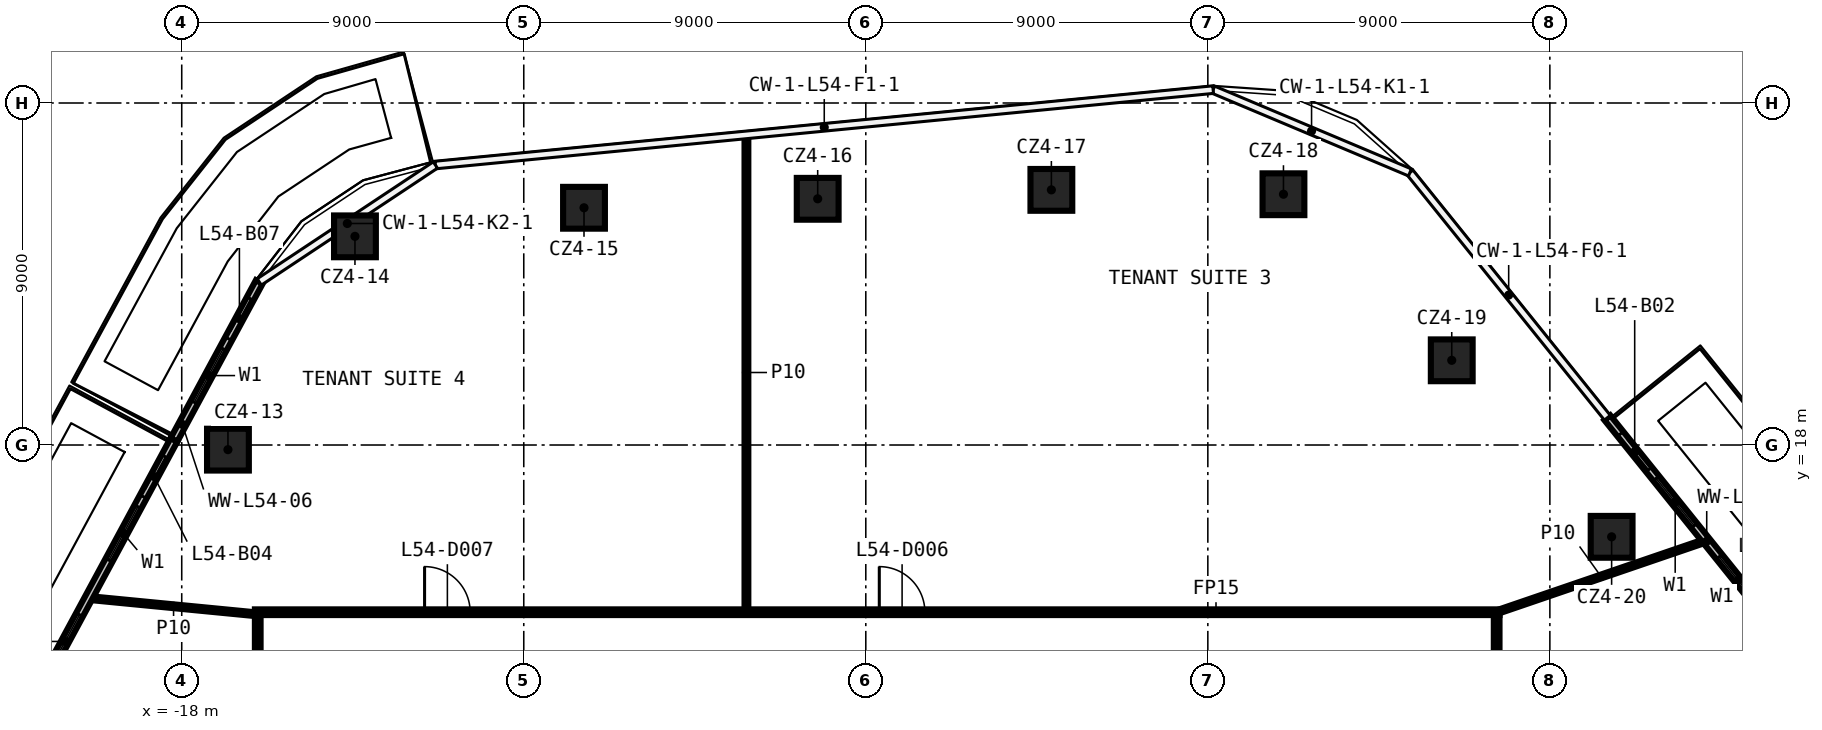
"""IFC4 building model, lengths in metres.
Left out: names, types, materials, properties, quantities, classifications, styles, units other than length and angle.
Written with IfcOpenShell. Run it as: python <this file> out.ifc"""

import sys

from ifc_helpers import new_model, si_unit, direction, frame, frame_2d, origin, origin_2d, place, context, subcontext, project, spatial, rectangle, extrude, element, fill, save


model = new_model("IFC4")
c1 = context("Model", 3, precision=1e-05, world=origin(), true_north=direction((0.0, 1.0)))
c2 = subcontext(c1, "Body", "Model", "MODEL_VIEW")
j1 = project(units=[si_unit("LENGTHUNIT", "METRE"), si_unit("PLANEANGLEUNIT", "RADIAN")], contexts=[c1])
p1 = place(None, origin())
s1 = spatial("IfcSite", under=j1, at=p1, CompositionType="ELEMENT")
p2 = place(p1, origin())
s2 = spatial("IfcBuilding", under=s1, at=p2, CompositionType="ELEMENT")
p3 = place(p2, frame((0.0, 0.0, 258.0)))
s3 = spatial("IfcBuildingStorey", under=s2, at=p3, CompositionType="ELEMENT", Elevation=258.0)
for number, where, z_axis, x_axis in (
    (1, (-16.784, 17.878, 0.0), (0.0, 0.0, 1.0), (1.0, 0.0, 0.0)),
    (2, (-13.442, 23.491, 0.0), (0.0, 0.0, 1.0), (1.0, 0.0, 0.0)),
    (3, (-7.415, 24.243, 0.0), (0.0, 0.0, 1.0), (1.0, 0.0, 0.0)),
    (4, (-1.266, 24.479, 0.0), (0.0, 0.0, 1.0), (1.0, 0.0, 0.0)),
    (5, (4.883, 24.714, 0.0), (0.0, 0.0, 1.0), (1.0, 0.0, 0.0)),
    (6, (10.99, 24.599, 0.0), (0.0, 0.0, 1.0), (1.0, 0.0, 0.0)),
    (7, (15.418, 20.229, 0.0), (0.0, 0.0, 1.0), (1.0, 0.0, 0.0)),
    (8, (19.625, 15.584, 0.0), (0.0, 0.0, 1.0), (1.0, 0.0, 0.0)),
):
    element("IfcColumn", number, at=place(p3, frame(where, z_axis=z_axis, x_axis=x_axis)), inside=s3, PredefinedType="COLUMN", context=c2, shape_type="SweptSolid", body=[
        extrude(rectangle(XDim=1.1, YDim=1.1, at=origin_2d()), origin(), (0.0, 0.0, 1.0), 3.82),
    ])
p4 = place(p3, frame((-16.075, 13.6, 0.0), z_axis=(0.0, 0.0, 1.0), x_axis=(1.0, 0.0, 0.0)))
e9 = element("IfcWall", 9, at=p4, inside=s3, PredefinedType="PARTITIONING", context=c2, shape_type="SweptSolid", body=[
    extrude(rectangle(XDim=32.75, YDim=0.15, at=frame_2d((16.375, 0.0))), origin(), (0.0, 0.0, 1.0), 3.82),
])
p5 = place(p4, frame((16.43, 0.0, 0.0)))
e10 = element("IfcOpeningElement", 10, at=p5, cuts=e9, PredefinedType="OPENING", context=c2, shape_type="SweptSolid", body=[
    extrude(rectangle(XDim=1.2, YDim=2.1, at=frame_2d((0.6, 1.05))), frame((0.0, 0.085, 0.0), z_axis=(0.0, -1.0, 0.0), x_axis=(1.0, 0.0, 0.0)), (0.0, 0.0, 1.0), 0.17),
])
p6 = place(p4, frame((4.465, 0.0, 0.0)))
e11 = element("IfcOpeningElement", 11, at=p6, cuts=e9, PredefinedType="OPENING", context=c2, shape_type="SweptSolid", body=[
    extrude(rectangle(XDim=1.2, YDim=2.1, at=frame_2d((0.6, 1.05))), frame((0.0, 0.085, 0.0), z_axis=(0.0, -1.0, 0.0), x_axis=(1.0, 0.0, 0.0)), (0.0, 0.0, 1.0), 0.17),
])
p7 = place(p3, frame((16.6, 13.6, 0.0), z_axis=(0.0, 0.0, 1.0), x_axis=(0.946142628781, 0.323750098073, 0.0)))
e12 = element("IfcWall", 12, at=p7, inside=s3, PredefinedType="PARTITIONING", context=c2, shape_type="SweptSolid", body=[
    extrude(rectangle(XDim=5.805, YDim=0.1, at=frame_2d((2.903, 0.0))), origin(), (0.0, 0.0, 1.0), 3.82),
])
p8 = place(p3, frame((16.6, 13.525, 0.0), z_axis=(0.0, 0.0, 1.0), x_axis=(0.0, -1.0, 0.0)))
e13 = element("IfcWall", 13, at=p8, inside=s3, PredefinedType="PARTITIONING", context=c2, shape_type="SweptSolid", body=[
    extrude(rectangle(XDim=27.05, YDim=0.15, at=frame_2d((13.525, 0.0))), origin(), (0.0, 0.0, 1.0), 3.82),
])
p9 = place(p8, frame((22.559, 0.0, 0.0)))
e14 = element("IfcOpeningElement", 14, at=p9, cuts=e13, PredefinedType="OPENING", context=c2, shape_type="SweptSolid", body=[
    extrude(rectangle(XDim=1.2, YDim=2.1, at=frame_2d((0.6, 1.05))), frame((0.0, 0.085, 0.0), z_axis=(0.0, -1.0, 0.0), x_axis=(1.0, 0.0, 0.0)), (0.0, 0.0, 1.0), 0.17),
])
p10 = place(p8, frame((11.036, 0.0, 0.0)))
e15 = element("IfcOpeningElement", 15, at=p10, cuts=e13, PredefinedType="OPENING", context=c2, shape_type="SweptSolid", body=[
    extrude(rectangle(XDim=1.2, YDim=2.1, at=frame_2d((0.6, 1.05))), frame((0.0, 0.085, 0.0), z_axis=(0.0, -1.0, 0.0), x_axis=(1.0, 0.0, 0.0)), (0.0, 0.0, 1.0), 0.17),
])
p11 = place(p3, frame((-3.141, 13.675, 0.0), z_axis=(0.0, 0.0, 1.0), x_axis=(0.0, 1.0, 0.0)))
e16 = element("IfcWall", 16, at=p11, inside=s3, PredefinedType="PARTITIONING", context=c2, shape_type="SweptSolid", body=[
    extrude(rectangle(XDim=12.466, YDim=0.1, at=frame_2d((6.233, 0.0))), origin(), (0.0, 0.0, 1.0), 3.82),
])
p12 = place(p3, frame((-16.0, 11.074, 0.0), z_axis=(0.0, 0.0, 1.0), x_axis=(0.0, 1.0, 0.0)))
e17 = element("IfcWall", 17, at=p12, inside=s3, PredefinedType="PARTITIONING", context=c2, shape_type="SweptSolid", body=[
    extrude(rectangle(XDim=2.451, YDim=0.15, at=frame_2d((1.226, 0.0))), origin(), (0.0, 0.0, 1.0), 3.82),
])
p13 = place(p3, frame((-20.43, 13.972, 0.0), z_axis=(0.0, 0.0, 1.0), x_axis=(0.995312443594, -0.096711631286, 0.0)))
e18 = element("IfcWall", 18, at=p13, inside=s3, PredefinedType="PARTITIONING", context=c2, shape_type="SweptSolid", body=[
    extrude(rectangle(XDim=4.45, YDim=0.1, at=frame_2d((2.225, 0.0))), origin(), (0.0, 0.0, 1.0), 3.82),
])
p14 = place(p3, frame((24.712, 12.255, 0.0), z_axis=(0.0, 0.0, 1.0), x_axis=(-0.626871708653, 0.77912249415, 0.0)))
e19 = element("IfcWall", 19, at=p14, inside=s3, PredefinedType="SOLIDWALL", context=c2, shape_type="SweptSolid", body=[
    extrude(rectangle(XDim=8.293, YDim=0.2, at=frame_2d((4.147, 0.0))), origin(), (0.0, 0.0, 1.0), 3.82),
])
p15 = place(p14, frame((2.0, 0.0, 0.6)))
e20 = element("IfcOpeningElement", 20, at=p15, cuts=e19, PredefinedType="OPENING", context=c2, shape_type="SweptSolid", body=[
    extrude(rectangle(XDim=1.6, YDim=2.4, at=frame_2d((0.8, 1.2))), frame((0.0, 0.11, 0.0), z_axis=(0.0, -1.0, 0.0), x_axis=(1.0, 0.0, 0.0)), (0.0, 0.0, 1.0), 0.22),
])
p16 = place(p14, frame((0.5, 0.0, 0.0)))
e21 = element("IfcOpeningElement", 21, at=p16, cuts=e19, PredefinedType="OPENING", context=c2, shape_type="SweptSolid", body=[
    extrude(rectangle(XDim=1.2, YDim=2.4, at=frame_2d((0.6, 1.2))), frame((0.0, 0.11, 0.0), z_axis=(0.0, -1.0, 0.0), x_axis=(1.0, 0.0, 0.0)), (0.0, 0.0, 1.0), 0.22),
])
p17 = place(p14, frame((4.647, 0.0, 0.6)))
e22 = element("IfcOpeningElement", 22, at=p17, cuts=e19, PredefinedType="OPENING", context=c2, shape_type="SweptSolid", body=[
    extrude(rectangle(XDim=1.6, YDim=2.4, at=frame_2d((0.8, 1.2))), frame((0.0, 0.11, 0.0), z_axis=(0.0, -1.0, 0.0), x_axis=(1.0, 0.0, 0.0)), (0.0, 0.0, 1.0), 0.22),
])
p18 = place(p14, frame((6.547, 0.0, 0.0)))
e23 = element("IfcOpeningElement", 23, at=p18, cuts=e19, PredefinedType="OPENING", context=c2, shape_type="SweptSolid", body=[
    extrude(rectangle(XDim=1.2, YDim=2.4, at=frame_2d((0.6, 1.2))), frame((0.0, 0.11, 0.0), z_axis=(0.0, -1.0, 0.0), x_axis=(1.0, 0.0, 0.0)), (0.0, 0.0, 1.0), 0.22),
])
p19 = place(p3, frame((-18.204, 18.136, 0.0), z_axis=(0.0, 0.0, 1.0), x_axis=(-0.475207525375, -0.87987374539, 0.0)))
e24 = element("IfcWall", 24, at=p19, inside=s3, PredefinedType="SOLIDWALL", context=c2, shape_type="SweptSolid", body=[
    extrude(rectangle(XDim=14.19, YDim=0.2, at=frame_2d((7.095, 0.0))), origin(), (0.0, 0.0, 1.0), 3.82),
])
p20 = place(p19, frame((2.0, 0.0, 0.6)))
e25 = element("IfcOpeningElement", 25, at=p20, cuts=e24, PredefinedType="OPENING", context=c2, shape_type="SweptSolid", body=[
    extrude(rectangle(XDim=1.6, YDim=2.4, at=frame_2d((0.8, 1.2))), frame((0.0, 0.11, 0.0), z_axis=(0.0, -1.0, 0.0), x_axis=(1.0, 0.0, 0.0)), (0.0, 0.0, 1.0), 0.22),
])
p21 = place(p19, frame((0.5, 0.0, 0.0)))
e26 = element("IfcOpeningElement", 26, at=p21, cuts=e24, PredefinedType="OPENING", context=c2, shape_type="SweptSolid", body=[
    extrude(rectangle(XDim=1.2, YDim=2.4, at=frame_2d((0.6, 1.2))), frame((0.0, 0.11, 0.0), z_axis=(0.0, -1.0, 0.0), x_axis=(1.0, 0.0, 0.0)), (0.0, 0.0, 1.0), 0.22),
])
p22 = place(p19, frame((5.23, 0.0, 0.6)))
e27 = element("IfcOpeningElement", 27, at=p22, cuts=e24, PredefinedType="OPENING", context=c2, shape_type="SweptSolid", body=[
    extrude(rectangle(XDim=1.6, YDim=2.4, at=frame_2d((0.8, 1.2))), frame((0.0, 0.11, 0.0), z_axis=(0.0, -1.0, 0.0), x_axis=(1.0, 0.0, 0.0)), (0.0, 0.0, 1.0), 0.22),
])
p23 = place(p19, frame((7.13, 0.0, 0.0)))
e28 = element("IfcOpeningElement", 28, at=p23, cuts=e24, PredefinedType="OPENING", context=c2, shape_type="SweptSolid", body=[
    extrude(rectangle(XDim=1.2, YDim=2.4, at=frame_2d((0.6, 1.2))), frame((0.0, 0.11, 0.0), z_axis=(0.0, -1.0, 0.0), x_axis=(1.0, 0.0, 0.0)), (0.0, 0.0, 1.0), 0.22),
])
p24 = place(p19, frame((11.46, 0.0, 0.6)))
e29 = element("IfcOpeningElement", 29, at=p24, cuts=e24, PredefinedType="OPENING", context=c2, shape_type="SweptSolid", body=[
    extrude(rectangle(XDim=1.6, YDim=2.4, at=frame_2d((0.8, 1.2))), frame((0.0, 0.11, 0.0), z_axis=(0.0, -1.0, 0.0), x_axis=(1.0, 0.0, 0.0)), (0.0, 0.0, 1.0), 0.22),
])
p25 = place(p19, frame((9.96, 0.0, 0.0)))
e30 = element("IfcOpeningElement", 30, at=p25, cuts=e24, PredefinedType="OPENING", context=c2, shape_type="SweptSolid", body=[
    extrude(rectangle(XDim=1.2, YDim=2.4, at=frame_2d((0.6, 1.2))), frame((0.0, 0.11, 0.0), z_axis=(0.0, -1.0, 0.0), x_axis=(1.0, 0.0, 0.0)), (0.0, 0.0, 1.0), 0.22),
])
p26 = place(p3, frame((-15.96, 22.291, 0.0), z_axis=(0.0, 0.0, 1.0), x_axis=(-0.47520015235, -0.879877727418, 0.0)))
e31 = element("IfcWall", 31, at=p26, inside=s3, PredefinedType="SOLIDWALL", context=c2, shape_type="SweptSolid", body=[
    extrude(rectangle(XDim=4.722, YDim=0.2, at=frame_2d((2.361, 0.0))), origin(), (0.0, 0.0, 1.0), 3.82),
])
p27 = place(p26, frame((2.0, 0.0, 0.6)))
e32 = element("IfcOpeningElement", 32, at=p27, cuts=e31, PredefinedType="OPENING", context=c2, shape_type="SweptSolid", body=[
    extrude(rectangle(XDim=1.6, YDim=2.4, at=frame_2d((0.8, 1.2))), frame((0.0, 0.11, 0.0), z_axis=(0.0, -1.0, 0.0), x_axis=(1.0, 0.0, 0.0)), (0.0, 0.0, 1.0), 0.22),
])
p28 = place(p26, frame((0.5, 0.0, 0.0)))
e33 = element("IfcOpeningElement", 33, at=p28, cuts=e31, PredefinedType="OPENING", context=c2, shape_type="SweptSolid", body=[
    extrude(rectangle(XDim=1.2, YDim=2.4, at=frame_2d((0.6, 1.2))), frame((0.0, 0.11, 0.0), z_axis=(0.0, -1.0, 0.0), x_axis=(1.0, 0.0, 0.0)), (0.0, 0.0, 1.0), 0.22),
])
p29 = place(p5, origin())
e34 = element("IfcDoor", 34, at=p29, inside=s3, OperationType="SINGLE_SWING_LEFT", PredefinedType="DOOR", context=c2, shape_type="SweptSolid", body=[
    extrude(rectangle(XDim=1.2, YDim=2.1, at=frame_2d((0.6, 1.05))), frame((0.0, 0.025, 0.0), z_axis=(0.0, -1.0, 0.0), x_axis=(1.0, 0.0, 0.0)), (0.0, 0.0, 1.0), 0.05),
])
fill(e10, e34)
p30 = place(p6, origin())
e35 = element("IfcDoor", 35, at=p30, inside=s3, OperationType="SINGLE_SWING_RIGHT", PredefinedType="DOOR", context=c2, shape_type="SweptSolid", body=[
    extrude(rectangle(XDim=1.2, YDim=2.1, at=frame_2d((0.6, 1.05))), frame((0.0, 0.025, 0.0), z_axis=(0.0, -1.0, 0.0), x_axis=(1.0, 0.0, 0.0)), (0.0, 0.0, 1.0), 0.05),
])
fill(e11, e35)
p31 = place(p15, origin())
e36 = element("IfcWindow", 36, at=p31, inside=s3, PartitioningType="SINGLE_PANEL", PredefinedType="WINDOW", context=c2, shape_type="SweptSolid", body=[
    extrude(rectangle(XDim=1.6, YDim=2.4, at=frame_2d((0.8, 1.2))), frame((0.0, 0.03, 0.0), z_axis=(0.0, -1.0, 0.0), x_axis=(1.0, 0.0, 0.0)), (0.0, 0.0, 1.0), 0.06),
])
fill(e20, e36)
p32 = place(p17, origin())
e37 = element("IfcWindow", 37, at=p32, inside=s3, PartitioningType="SINGLE_PANEL", PredefinedType="WINDOW", context=c2, shape_type="SweptSolid", body=[
    extrude(rectangle(XDim=1.6, YDim=2.4, at=frame_2d((0.8, 1.2))), frame((0.0, 0.03, 0.0), z_axis=(0.0, -1.0, 0.0), x_axis=(1.0, 0.0, 0.0)), (0.0, 0.0, 1.0), 0.06),
])
fill(e22, e37)
p33 = place(p18, origin())
e38 = element("IfcDoor", 38, at=p33, inside=s3, OperationType="SLIDING_TO_LEFT", PredefinedType="DOOR", context=c2, shape_type="SweptSolid", body=[
    extrude(rectangle(XDim=1.2, YDim=2.4, at=frame_2d((0.6, 1.2))), frame((0.0, 0.025, 0.0), z_axis=(0.0, -1.0, 0.0), x_axis=(1.0, 0.0, 0.0)), (0.0, 0.0, 1.0), 0.05),
])
fill(e23, e38)
p34 = place(p20, origin())
e39 = element("IfcWindow", 39, at=p34, inside=s3, PartitioningType="SINGLE_PANEL", PredefinedType="WINDOW", context=c2, shape_type="SweptSolid", body=[
    extrude(rectangle(XDim=1.6, YDim=2.4, at=frame_2d((0.8, 1.2))), frame((0.0, 0.03, 0.0), z_axis=(0.0, -1.0, 0.0), x_axis=(1.0, 0.0, 0.0)), (0.0, 0.0, 1.0), 0.06),
])
fill(e25, e39)
p35 = place(p21, origin())
e40 = element("IfcDoor", 40, at=p35, inside=s3, OperationType="SLIDING_TO_LEFT", PredefinedType="DOOR", context=c2, shape_type="SweptSolid", body=[
    extrude(rectangle(XDim=1.2, YDim=2.4, at=frame_2d((0.6, 1.2))), frame((0.0, 0.025, 0.0), z_axis=(0.0, -1.0, 0.0), x_axis=(1.0, 0.0, 0.0)), (0.0, 0.0, 1.0), 0.05),
])
fill(e26, e40)
p36 = place(p22, origin())
e41 = element("IfcWindow", 41, at=p36, inside=s3, PartitioningType="SINGLE_PANEL", PredefinedType="WINDOW", context=c2, shape_type="SweptSolid", body=[
    extrude(rectangle(XDim=1.6, YDim=2.4, at=frame_2d((0.8, 1.2))), frame((0.0, 0.03, 0.0), z_axis=(0.0, -1.0, 0.0), x_axis=(1.0, 0.0, 0.0)), (0.0, 0.0, 1.0), 0.06),
])
fill(e27, e41)
p37 = place(p27, origin())
e42 = element("IfcWindow", 42, at=p37, inside=s3, PartitioningType="SINGLE_PANEL", PredefinedType="WINDOW", context=c2, shape_type="SweptSolid", body=[
    extrude(rectangle(XDim=1.6, YDim=2.4, at=frame_2d((0.8, 1.2))), frame((0.0, 0.03, 0.0), z_axis=(0.0, -1.0, 0.0), x_axis=(1.0, 0.0, 0.0)), (0.0, 0.0, 1.0), 0.06),
])
fill(e32, e42)
p38 = place(p28, origin())
e43 = element("IfcDoor", 43, at=p38, inside=s3, OperationType="SLIDING_TO_LEFT", PredefinedType="DOOR", context=c2, shape_type="SweptSolid", body=[
    extrude(rectangle(XDim=1.2, YDim=2.4, at=frame_2d((0.6, 1.2))), frame((0.0, 0.025, 0.0), z_axis=(0.0, -1.0, 0.0), x_axis=(1.0, 0.0, 0.0)), (0.0, 0.0, 1.0), 0.05),
])
fill(e33, e43)
save(model, sys.argv[1])
